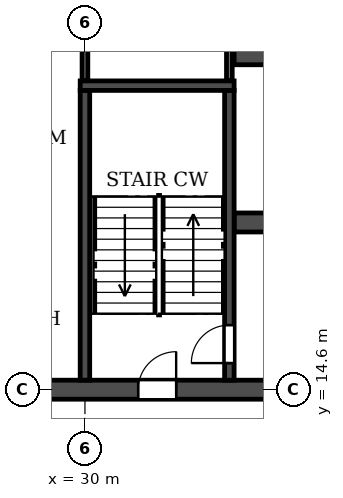
"""IFC4 building model, lengths in metres.
Left out: names, types, materials, properties, quantities, classifications, styles, units other than length and angle.
Written with IfcOpenShell. Run it as: python <this file> out.ifc"""

import sys

from ifc_helpers import new_model, si_unit, direction, frame, frame_2d, origin, place, context, subcontext, project, spatial, rectangle, extrude, element, fill, save


model = new_model("IFC4")
c1 = context("Model", 3, precision=1e-05, world=origin(), true_north=direction((0.0, 1.0)))
c2 = subcontext(c1, "Body", "Model", "MODEL_VIEW")
j1 = project(units=[si_unit("LENGTHUNIT", "METRE"), si_unit("PLANEANGLEUNIT", "RADIAN")], contexts=[c1])
p1 = place(None, origin())
s1 = spatial("IfcSite", under=j1, at=p1, CompositionType="ELEMENT")
p2 = place(p1, origin())
s2 = spatial("IfcBuilding", under=s1, at=p2, CompositionType="ELEMENT")
p3 = place(p2, frame((0.0, 0.0, 109.2)))
s3 = spatial("IfcBuildingStorey", under=s2, at=p3, CompositionType="ELEMENT", Elevation=109.2)
p4 = place(p3, frame((14.6, 14.6, 0.0), z_axis=(0.0, 0.0, 1.0), x_axis=(1.0, 0.0, 0.0)))
e1 = element("IfcWall", 1, at=p4, inside=s3, PredefinedType="SOLIDWALL", context=c2, shape_type="SweptSolid", body=[
    extrude(rectangle(XDim=72.8, YDim=0.5, at=frame_2d((36.4, 0.0))), origin(), (0.0, 0.0, 1.0), 3.06),
])
p5 = place(p4, frame((1.2, 0.0, 0.0)))
e2 = element("IfcOpeningElement", 2, at=p5, cuts=e1, PredefinedType="OPENING", context=c2, shape_type="SweptSolid", body=[
    extrude(rectangle(XDim=1.0, YDim=2.1, at=frame_2d((0.5, 1.05))), frame((0.0, 0.26, 0.0), z_axis=(0.0, -1.0, 0.0), x_axis=(1.0, 0.0, 0.0)), (0.0, 0.0, 1.0), 0.52),
])
p6 = place(p4, frame((4.3, 0.0, 0.0)))
e3 = element("IfcOpeningElement", 3, at=p6, cuts=e1, PredefinedType="OPENING", context=c2, shape_type="SweptSolid", body=[
    extrude(rectangle(XDim=1.0, YDim=2.1, at=frame_2d((0.5, 1.05))), frame((0.0, 0.26, 0.0), z_axis=(0.0, -1.0, 0.0), x_axis=(1.0, 0.0, 0.0)), (0.0, 0.0, 1.0), 0.52),
])
p7 = place(p4, frame((12.2, 0.0, 0.0)))
e4 = element("IfcOpeningElement", 4, at=p7, cuts=e1, PredefinedType="OPENING", context=c2, shape_type="SweptSolid", body=[
    extrude(rectangle(XDim=1.0, YDim=2.1, at=frame_2d((0.5, 1.05))), frame((0.0, 0.26, 0.0), z_axis=(0.0, -1.0, 0.0), x_axis=(1.0, 0.0, 0.0)), (0.0, 0.0, 1.0), 0.52),
])
p8 = place(p4, frame((16.8, 0.0, 0.0)))
e5 = element("IfcOpeningElement", 5, at=p8, cuts=e1, PredefinedType="OPENING", context=c2, shape_type="SweptSolid", body=[
    extrude(rectangle(XDim=1.0, YDim=2.1, at=frame_2d((0.5, 1.05))), frame((0.0, 0.26, 0.0), z_axis=(0.0, -1.0, 0.0), x_axis=(1.0, 0.0, 0.0)), (0.0, 0.0, 1.0), 0.52),
])
p9 = place(p4, frame((28.1, 0.0, 0.0)))
e6 = element("IfcOpeningElement", 6, at=p9, cuts=e1, PredefinedType="OPENING", context=c2, shape_type="SweptSolid", body=[
    extrude(rectangle(XDim=1.0, YDim=2.1, at=frame_2d((0.5, 1.05))), frame((0.0, 0.26, 0.0), z_axis=(0.0, -1.0, 0.0), x_axis=(1.0, 0.0, 0.0)), (0.0, 0.0, 1.0), 0.52),
])
p10 = place(p4, frame((32.0, 0.0, 0.0)))
e7 = element("IfcOpeningElement", 7, at=p10, cuts=e1, PredefinedType="OPENING", context=c2, shape_type="SweptSolid", body=[
    extrude(rectangle(XDim=1.0, YDim=2.1, at=frame_2d((0.5, 1.05))), frame((0.0, 0.26, 0.0), z_axis=(0.0, -1.0, 0.0), x_axis=(1.0, 0.0, 0.0)), (0.0, 0.0, 1.0), 0.52),
])
p11 = place(p4, frame((35.9, 0.0, 0.0)))
e8 = element("IfcOpeningElement", 8, at=p11, cuts=e1, PredefinedType="OPENING", context=c2, shape_type="SweptSolid", body=[
    extrude(rectangle(XDim=1.0, YDim=2.1, at=frame_2d((0.5, 1.05))), frame((0.0, 0.26, 0.0), z_axis=(0.0, -1.0, 0.0), x_axis=(1.0, 0.0, 0.0)), (0.0, 0.0, 1.0), 0.52),
])
p12 = place(p4, frame((39.8, 0.0, 0.0)))
e9 = element("IfcOpeningElement", 9, at=p12, cuts=e1, PredefinedType="OPENING", context=c2, shape_type="SweptSolid", body=[
    extrude(rectangle(XDim=1.0, YDim=2.1, at=frame_2d((0.5, 1.05))), frame((0.0, 0.26, 0.0), z_axis=(0.0, -1.0, 0.0), x_axis=(1.0, 0.0, 0.0)), (0.0, 0.0, 1.0), 0.52),
])
p13 = place(p4, frame((43.7, 0.0, 0.0)))
e10 = element("IfcOpeningElement", 10, at=p13, cuts=e1, PredefinedType="OPENING", context=c2, shape_type="SweptSolid", body=[
    extrude(rectangle(XDim=1.0, YDim=2.1, at=frame_2d((0.5, 1.05))), frame((0.0, 0.26, 0.0), z_axis=(0.0, -1.0, 0.0), x_axis=(1.0, 0.0, 0.0)), (0.0, 0.0, 1.0), 0.52),
])
p14 = place(p4, frame((55.0, 0.0, 0.0)))
e11 = element("IfcOpeningElement", 11, at=p14, cuts=e1, PredefinedType="OPENING", context=c2, shape_type="SweptSolid", body=[
    extrude(rectangle(XDim=1.0, YDim=2.1, at=frame_2d((0.5, 1.05))), frame((0.0, 0.26, 0.0), z_axis=(0.0, -1.0, 0.0), x_axis=(1.0, 0.0, 0.0)), (0.0, 0.0, 1.0), 0.52),
])
p15 = place(p4, frame((59.6, 0.0, 0.0)))
e12 = element("IfcOpeningElement", 12, at=p15, cuts=e1, PredefinedType="OPENING", context=c2, shape_type="SweptSolid", body=[
    extrude(rectangle(XDim=1.0, YDim=2.1, at=frame_2d((0.5, 1.05))), frame((0.0, 0.26, 0.0), z_axis=(0.0, -1.0, 0.0), x_axis=(1.0, 0.0, 0.0)), (0.0, 0.0, 1.0), 0.52),
])
p16 = place(p4, frame((67.5, 0.0, 0.0)))
e13 = element("IfcOpeningElement", 13, at=p16, cuts=e1, PredefinedType="OPENING", context=c2, shape_type="SweptSolid", body=[
    extrude(rectangle(XDim=1.0, YDim=2.1, at=frame_2d((0.5, 1.05))), frame((0.0, 0.26, 0.0), z_axis=(0.0, -1.0, 0.0), x_axis=(1.0, 0.0, 0.0)), (0.0, 0.0, 1.0), 0.52),
])
p17 = place(p4, frame((70.35, 0.0, 0.0)))
e14 = element("IfcOpeningElement", 14, at=p17, cuts=e1, PredefinedType="OPENING", context=c2, shape_type="SweptSolid", body=[
    extrude(rectangle(XDim=1.5, YDim=2.1, at=frame_2d((0.75, 1.05))), frame((0.0, 0.26, 0.0), z_axis=(0.0, -1.0, 0.0), x_axis=(1.0, 0.0, 0.0)), (0.0, 0.0, 1.0), 0.52),
])
p18 = place(p3, frame((33.925, 19.0, 0.0), z_axis=(0.0, 0.0, 1.0), x_axis=(1.0, 0.0, 0.0)))
e15 = element("IfcWall", 15, at=p18, inside=s3, PredefinedType="SOLIDWALL", context=c2, shape_type="SweptSolid", body=[
    extrude(rectangle(XDim=34.15, YDim=0.5, at=frame_2d((17.075, 0.0))), origin(), (0.0, 0.0, 1.0), 3.06),
])
p19 = place(p18, frame((16.175, 0.0, 0.0)))
e16 = element("IfcOpeningElement", 16, at=p19, cuts=e15, PredefinedType="OPENING", context=c2, shape_type="SweptSolid", body=[
    extrude(rectangle(XDim=1.8, YDim=2.1, at=frame_2d((0.9, 1.05))), frame((0.0, 0.26, 0.0), z_axis=(0.0, -1.0, 0.0), x_axis=(1.0, 0.0, 0.0)), (0.0, 0.0, 1.0), 0.52),
])
p20 = place(p18, frame((1.525, 0.0, 0.0)))
e17 = element("IfcOpeningElement", 17, at=p20, cuts=e15, PredefinedType="OPENING", context=c2, shape_type="SweptSolid", body=[
    extrude(rectangle(XDim=1.8, YDim=2.1, at=frame_2d((0.9, 1.05))), frame((0.0, 0.26, 0.0), z_axis=(0.0, -1.0, 0.0), x_axis=(1.0, 0.0, 0.0)), (0.0, 0.0, 1.0), 0.52),
])
p21 = place(p18, frame((8.725, 0.0, 0.0)))
e18 = element("IfcOpeningElement", 18, at=p21, cuts=e15, PredefinedType="OPENING", context=c2, shape_type="SweptSolid", body=[
    extrude(rectangle(XDim=1.1, YDim=2.1, at=frame_2d((0.55, 1.05))), frame((0.0, 0.26, 0.0), z_axis=(0.0, -1.0, 0.0), x_axis=(1.0, 0.0, 0.0)), (0.0, 0.0, 1.0), 0.52),
])
p22 = place(p18, frame((11.325, 0.0, 0.0)))
e19 = element("IfcOpeningElement", 19, at=p22, cuts=e15, PredefinedType="OPENING", context=c2, shape_type="SweptSolid", body=[
    extrude(rectangle(XDim=1.1, YDim=2.1, at=frame_2d((0.55, 1.05))), frame((0.0, 0.26, 0.0), z_axis=(0.0, -1.0, 0.0), x_axis=(1.0, 0.0, 0.0)), (0.0, 0.0, 1.0), 0.52),
])
p23 = place(p18, frame((13.925, 0.0, 0.0)))
e20 = element("IfcOpeningElement", 20, at=p23, cuts=e15, PredefinedType="OPENING", context=c2, shape_type="SweptSolid", body=[
    extrude(rectangle(XDim=1.1, YDim=2.1, at=frame_2d((0.55, 1.05))), frame((0.0, 0.26, 0.0), z_axis=(0.0, -1.0, 0.0), x_axis=(1.0, 0.0, 0.0)), (0.0, 0.0, 1.0), 0.52),
])
p24 = place(p18, frame((19.125, 0.0, 0.0)))
e21 = element("IfcOpeningElement", 21, at=p24, cuts=e15, PredefinedType="OPENING", context=c2, shape_type="SweptSolid", body=[
    extrude(rectangle(XDim=1.1, YDim=2.1, at=frame_2d((0.55, 1.05))), frame((0.0, 0.26, 0.0), z_axis=(0.0, -1.0, 0.0), x_axis=(1.0, 0.0, 0.0)), (0.0, 0.0, 1.0), 0.52),
])
p25 = place(p18, frame((21.725, 0.0, 0.0)))
e22 = element("IfcOpeningElement", 22, at=p25, cuts=e15, PredefinedType="OPENING", context=c2, shape_type="SweptSolid", body=[
    extrude(rectangle(XDim=1.1, YDim=2.1, at=frame_2d((0.55, 1.05))), frame((0.0, 0.26, 0.0), z_axis=(0.0, -1.0, 0.0), x_axis=(1.0, 0.0, 0.0)), (0.0, 0.0, 1.0), 0.52),
])
p26 = place(p18, frame((24.325, 0.0, 0.0)))
e23 = element("IfcOpeningElement", 23, at=p26, cuts=e15, PredefinedType="OPENING", context=c2, shape_type="SweptSolid", body=[
    extrude(rectangle(XDim=1.1, YDim=2.1, at=frame_2d((0.55, 1.05))), frame((0.0, 0.26, 0.0), z_axis=(0.0, -1.0, 0.0), x_axis=(1.0, 0.0, 0.0)), (0.0, 0.0, 1.0), 0.52),
])
p27 = place(p18, frame((30.825, 0.0, 0.0)))
e24 = element("IfcOpeningElement", 24, at=p27, cuts=e15, PredefinedType="OPENING", context=c2, shape_type="SweptSolid", body=[
    extrude(rectangle(XDim=1.8, YDim=2.1, at=frame_2d((0.9, 1.05))), frame((0.0, 0.26, 0.0), z_axis=(0.0, -1.0, 0.0), x_axis=(1.0, 0.0, 0.0)), (0.0, 0.0, 1.0), 0.52),
])
p28 = place(p3, frame((33.925, 23.4, 0.0), z_axis=(0.0, 0.0, 1.0), x_axis=(1.0, 0.0, 0.0)))
e25 = element("IfcWall", 25, at=p28, inside=s3, PredefinedType="SOLIDWALL", context=c2, shape_type="SweptSolid", body=[
    extrude(rectangle(XDim=34.15, YDim=0.5, at=frame_2d((17.075, 0.0))), origin(), (0.0, 0.0, 1.0), 3.06),
])
p29 = place(p28, frame((16.175, 0.0, 0.0)))
e26 = element("IfcOpeningElement", 26, at=p29, cuts=e25, PredefinedType="OPENING", context=c2, shape_type="SweptSolid", body=[
    extrude(rectangle(XDim=1.8, YDim=2.1, at=frame_2d((0.9, 1.05))), frame((0.0, 0.26, 0.0), z_axis=(0.0, -1.0, 0.0), x_axis=(1.0, 0.0, 0.0)), (0.0, 0.0, 1.0), 0.52),
])
p30 = place(p28, frame((11.025, 0.0, 0.0)))
e27 = element("IfcOpeningElement", 27, at=p30, cuts=e25, PredefinedType="OPENING", context=c2, shape_type="SweptSolid", body=[
    extrude(rectangle(XDim=1.1, YDim=2.1, at=frame_2d((0.55, 1.05))), frame((0.0, 0.26, 0.0), z_axis=(0.0, -1.0, 0.0), x_axis=(1.0, 0.0, 0.0)), (0.0, 0.0, 1.0), 0.52),
])
p31 = place(p3, frame((30.0, 14.85, 0.0), z_axis=(0.0, 0.0, 1.0), x_axis=(0.0, 1.0, 0.0)))
e28 = element("IfcWall", 28, at=p31, inside=s3, PredefinedType="SOLIDWALL", context=c2, shape_type="SweptSolid", body=[
    extrude(rectangle(XDim=7.625, YDim=0.25, at=frame_2d((3.812, 0.0))), origin(), (0.0, 0.0, 1.0), 3.06),
])
p32 = place(p3, frame((33.8, 14.85, 0.0), z_axis=(0.0, 0.0, 1.0), x_axis=(0.0, 1.0, 0.0)))
e29 = element("IfcWall", 29, at=p32, inside=s3, PredefinedType="SOLIDWALL", context=c2, shape_type="SweptSolid", body=[
    extrude(rectangle(XDim=7.625, YDim=0.25, at=frame_2d((3.812, 0.0))), origin(), (0.0, 0.0, 1.0), 3.06),
])
p33 = place(p32, frame((0.45, 0.0, 0.0)))
e30 = element("IfcOpeningElement", 30, at=p33, cuts=e29, PredefinedType="OPENING", context=c2, shape_type="SweptSolid", body=[
    extrude(rectangle(XDim=1.0, YDim=2.1, at=frame_2d((0.5, 1.05))), frame((0.0, 0.135, 0.0), z_axis=(0.0, -1.0, 0.0), x_axis=(1.0, 0.0, 0.0)), (0.0, 0.0, 1.0), 0.27),
])
p34 = place(p3, frame((29.875, 22.6, 0.0), z_axis=(0.0, 0.0, 1.0), x_axis=(1.0, 0.0, 0.0)))
e31 = element("IfcWall", 31, at=p34, inside=s3, PredefinedType="SOLIDWALL", context=c2, shape_type="SweptSolid", body=[
    extrude(rectangle(XDim=4.05, YDim=0.25, at=frame_2d((2.025, 0.0))), origin(), (0.0, 0.0, 1.0), 3.06),
])
for number, where, z_axis, x_axis in (
    (32, (30.0, 22.735, 0.0), (0.0, 0.0, 1.0), (0.0, 1.0, 0.0)),
    (33, (33.8, 22.735, 0.0), (0.0, 0.0, 1.0), (0.0, 1.0, 0.0)),
):
    element("IfcWall", number, at=place(p3, frame(where, z_axis=z_axis, x_axis=x_axis)), inside=s3, PredefinedType="PARTITIONING", context=c2, shape_type="SweptSolid", body=[
        extrude(rectangle(XDim=4.805, YDim=0.15, at=frame_2d((2.402, 0.0))), origin(), (0.0, 0.0, 1.0), 3.06),
    ])
p35 = place(p8, origin())
e34 = element("IfcDoor", 34, at=p35, inside=s3, OperationType="SINGLE_SWING_RIGHT", PredefinedType="DOOR", context=c2, shape_type="SweptSolid", body=[
    extrude(rectangle(XDim=1.0, YDim=2.1, at=frame_2d((0.5, 1.05))), frame((0.0, 0.025, 0.0), z_axis=(0.0, -1.0, 0.0), x_axis=(1.0, 0.0, 0.0)), (0.0, 0.0, 1.0), 0.05),
])
fill(e5, e34)
p36 = place(p33, origin())
e35 = element("IfcDoor", 35, at=p36, inside=s3, OperationType="SINGLE_SWING_LEFT", PredefinedType="DOOR", context=c2, shape_type="SweptSolid", body=[
    extrude(rectangle(XDim=1.0, YDim=2.1, at=frame_2d((0.5, 1.05))), frame((0.0, 0.025, 0.0), z_axis=(0.0, -1.0, 0.0), x_axis=(1.0, 0.0, 0.0)), (0.0, 0.0, 1.0), 0.05),
])
fill(e30, e35)
save(model, sys.argv[1])
